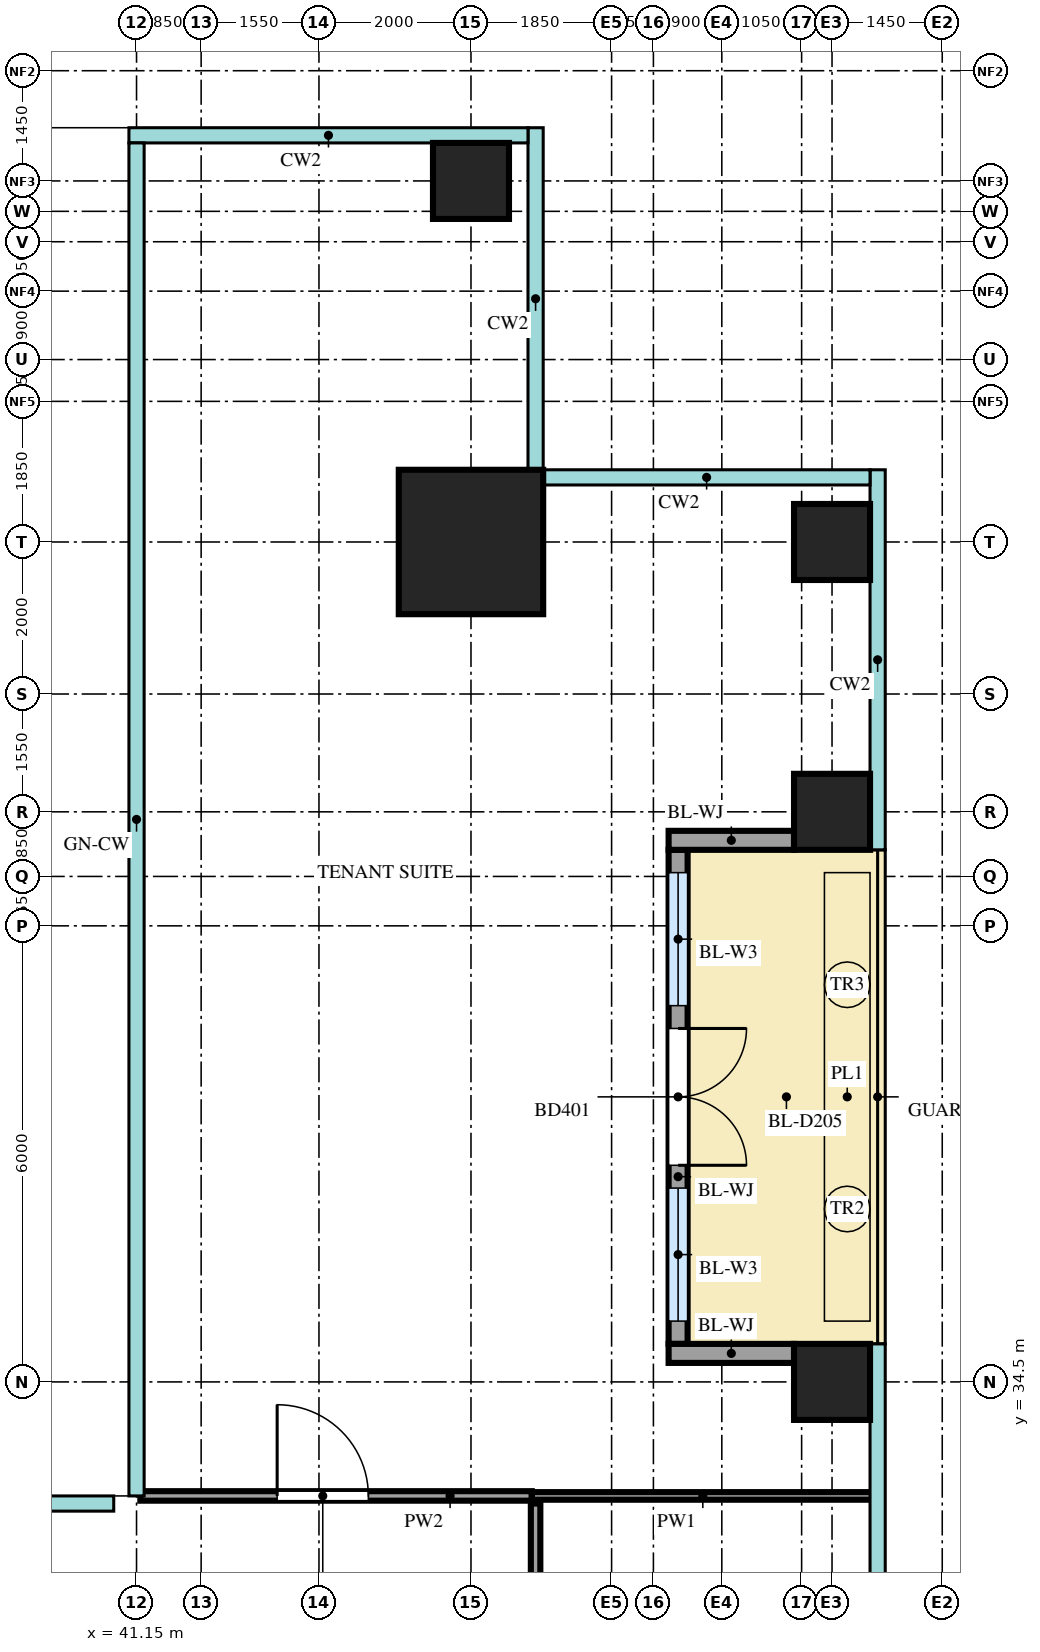
"""IFC4 building model, lengths in metres.
Left out: names, types, materials, properties, quantities, classifications, styles, units other than length and angle.
Written with IfcOpenShell. Run it as: python <this file> out.ifc"""

import sys

from ifc_helpers import new_model, si_unit, direction, frame, frame_2d, origin, origin_2d, place, context, subcontext, project, spatial, rectangle, extrude, source, transform, mapped, element, fill, save


model = new_model("IFC4")
c1 = context("Model", 3, precision=1e-05, world=origin(), true_north=direction((0.0, 1.0)))
c2 = subcontext(c1, "Body", "Model", "MODEL_VIEW")
j1 = project(units=[si_unit("LENGTHUNIT", "METRE"), si_unit("PLANEANGLEUNIT", "RADIAN")], contexts=[c1])
p1 = place(None, origin())
s1 = spatial("IfcSite", under=j1, at=p1, CompositionType="ELEMENT")
p2 = place(p1, origin())
s2 = spatial("IfcBuilding", under=s1, at=p2, CompositionType="ELEMENT")
p3 = place(p2, frame((0.0, 0.0, 184.7)))
s3 = spatial("IfcBuildingStorey", under=s2, at=p3, CompositionType="ELEMENT", Elevation=184.7)
m1 = source(origin(), c2, "Body", "SweptSolid", [
    extrude(rectangle(XDim=1.9, YDim=1.9, at=origin_2d()), origin(), (0.0, 0.0, 1.0), 4.0),
])
p4 = place(p3, frame((45.55, 45.55, 0.0), z_axis=(0.0, 0.0, 1.0), x_axis=(1.0, 0.0, 0.0)))
e1 = element("IfcColumn", 1, at=p4, inside=s3, PredefinedType="COLUMN", context=c2, shape_type="MappedRepresentation", body=[
    mapped(m1, transform((0.0, 0.0, 0.0))),
])
m2 = source(origin(), c2, "Body", "SweptSolid", [
    extrude(rectangle(XDim=1.0, YDim=1.0, at=origin_2d()), origin(), (0.0, 0.0, 1.0), 3.75),
])
for number, where, z_axis, x_axis in (
    (2, (50.3, 34.5, 0.0), (0.0, 0.0, 1.0), (1.0, 0.0, 0.0)),
    (3, (50.3, 42.0, 0.0), (0.0, 0.0, 1.0), (1.0, 0.0, 0.0)),
    (4, (50.3, 45.55, 0.0), (0.0, 0.0, 1.0), (1.0, 0.0, 0.0)),
    (5, (45.55, 50.3, 0.0), (0.0, 0.0, 1.0), (1.0, 0.0, 0.0)),
):
    element("IfcColumn", number, at=place(p3, frame(where, z_axis=z_axis, x_axis=x_axis)), inside=s3, PredefinedType="COLUMN", context=c2, shape_type="MappedRepresentation", body=[
        mapped(m2, transform((0.0, 0.0, 0.0))),
    ])
m3 = source(origin(), c2, "Body", "SweptSolid", [
    extrude(rectangle(XDim=6.5, YDim=0.25, at=frame_2d((3.25, 0.0))), origin(), (0.0, 0.0, 1.0), 3.2),
])
p5 = place(p3, frame((48.275, 35.0, 0.0), z_axis=(0.0, 0.0, 1.0), x_axis=(0.0, 1.0, 0.0)))
e6 = element("IfcWall", 6, at=p5, inside=s3, PredefinedType="SOLIDWALL", context=c2, shape_type="MappedRepresentation", body=[
    mapped(m3, transform((0.0, 0.0, 0.0))),
])
m4 = source(origin(), c2, "Body", "SweptSolid", [
    extrude(rectangle(XDim=1.75, YDim=2.4, at=frame_2d((0.875, 1.2))), frame((0.0, 0.135, 0.0), z_axis=(0.0, -1.0, 0.0), x_axis=(1.0, 0.0, 0.0)), (0.0, 0.0, 1.0), 0.27),
])
p6 = place(p5, frame((0.3, 0.0, 0.0)))
e7 = element("IfcOpeningElement", 7, at=p6, cuts=e6, PredefinedType="OPENING", context=c2, shape_type="MappedRepresentation", body=[
    mapped(m4, transform((0.0, 0.0, 0.0))),
])
p7 = place(p5, frame((4.45, 0.0, 0.0)))
e8 = element("IfcOpeningElement", 8, at=p7, cuts=e6, PredefinedType="OPENING", context=c2, shape_type="MappedRepresentation", body=[
    mapped(m4, transform((0.0, 0.0, 0.0))),
])
m5 = source(origin(), c2, "Body", "SweptSolid", [
    extrude(rectangle(XDim=1.8, YDim=2.4, at=frame_2d((0.9, 1.2))), frame((0.0, 0.135, 0.0), z_axis=(0.0, -1.0, 0.0), x_axis=(1.0, 0.0, 0.0)), (0.0, 0.0, 1.0), 0.27),
])
p8 = place(p5, frame((2.35, 0.0, 0.0)))
e9 = element("IfcOpeningElement", 9, at=p8, cuts=e6, PredefinedType="OPENING", context=c2, shape_type="MappedRepresentation", body=[
    mapped(m5, transform((0.0, 0.0, 0.0))),
])
m6 = source(origin(), c2, "Body", "SweptSolid", [
    extrude(rectangle(XDim=1.65, YDim=0.25, at=frame_2d((0.825, 0.0))), origin(), (0.0, 0.0, 1.0), 3.2),
])
for number, where, z_axis, x_axis in (
    (10, (49.8, 34.875, 0.0), (0.0, 0.0, 1.0), (-1.0, 0.0, 0.0)),
    (11, (49.8, 41.625, 0.0), (0.0, 0.0, 1.0), (-1.0, 0.0, 0.0)),
):
    element("IfcWall", number, at=place(p3, frame(where, z_axis=z_axis, x_axis=x_axis)), inside=s3, PredefinedType="SOLIDWALL", context=c2, shape_type="MappedRepresentation", body=[
        mapped(m6, transform((0.0, 0.0, 0.0))),
    ])
m7 = source(origin(), c2, "Body", "SweptSolid", [
    extrude(rectangle(XDim=3.2, YDim=0.125, at=frame_2d((1.6, 0.0))), origin(), (0.0, 0.0, 1.0), 3.8),
])
p9 = place(p3, frame((46.4, 29.7, 0.0), z_axis=(0.0, 0.0, 1.0), x_axis=(0.0, 1.0, 0.0)))
e12 = element("IfcWall", 12, at=p9, inside=s3, PredefinedType="PARTITIONING", context=c2, shape_type="MappedRepresentation", body=[
    mapped(m7, transform((0.0, 0.0, 0.0))),
])
m8 = source(origin(), c2, "Body", "SweptSolid", [
    extrude(rectangle(XDim=0.9, YDim=2.1, at=frame_2d((0.45, 1.05))), frame((0.0, 0.073, 0.0), z_axis=(0.0, -1.0, 0.0), x_axis=(1.0, 0.0, 0.0)), (0.0, 0.0, 1.0), 0.145),
])
p10 = place(p9, frame((1.15, 0.0, 0.0)))
e13 = element("IfcOpeningElement", 13, at=p10, cuts=e12, PredefinedType="OPENING", context=c2, shape_type="MappedRepresentation", body=[
    mapped(m8, transform((0.0, 0.0, 0.0))),
])
m9 = source(origin(), c2, "Body", "SweptSolid", [
    extrude(rectangle(XDim=5.15, YDim=0.125, at=frame_2d((2.575, 0.0))), origin(), (0.0, 0.0, 1.0), 3.8),
])
p11 = place(p3, frame((41.2, 33.0, 0.0), z_axis=(0.0, 0.0, 1.0), x_axis=(1.0, 0.0, 0.0)))
e14 = element("IfcWall", 14, at=p11, inside=s3, PredefinedType="PARTITIONING", context=c2, shape_type="MappedRepresentation", body=[
    mapped(m9, transform((0.0, 0.0, 0.0))),
])
m10 = source(origin(), c2, "Body", "SweptSolid", [
    extrude(rectangle(XDim=1.2, YDim=2.1, at=frame_2d((0.6, 1.05))), frame((0.0, 0.073, 0.0), z_axis=(0.0, -1.0, 0.0), x_axis=(1.0, 0.0, 0.0)), (0.0, 0.0, 1.0), 0.145),
])
p12 = place(p11, frame((1.8, 0.0, 0.0)))
e15 = element("IfcOpeningElement", 15, at=p12, cuts=e14, PredefinedType="OPENING", context=c2, shape_type="MappedRepresentation", body=[
    mapped(m10, transform((0.0, 0.0, 0.0))),
])
m11 = source(origin(), c2, "Body", "SweptSolid", [
    extrude(rectangle(XDim=4.5, YDim=0.1, at=frame_2d((2.25, 0.0))), origin(), (0.0, 0.0, 1.0), 3.8),
])
p13 = place(p3, frame((46.35, 33.0, 0.0), z_axis=(0.0, 0.0, 1.0), x_axis=(1.0, 0.0, 0.0)))
e16 = element("IfcWall", 16, at=p13, inside=s3, PredefinedType="PARTITIONING", context=c2, shape_type="MappedRepresentation", body=[
    mapped(m11, transform((0.0, 0.0, 0.0))),
])
m12 = source(origin(), c2, "Body", "SweptSolid", [
    extrude(rectangle(XDim=1.75, YDim=2.4, at=frame_2d((0.875, 1.2))), frame((0.0, 0.03, 0.0), z_axis=(0.0, -1.0, 0.0), x_axis=(1.0, 0.0, 0.0)), (0.0, 0.0, 1.0), 0.06),
])
p14 = place(p6, origin())
e17 = element("IfcWindow", 17, at=p14, inside=s3, PartitioningType="SINGLE_PANEL", PredefinedType="WINDOW", context=c2, shape_type="MappedRepresentation", body=[
    mapped(m12, transform((0.0, 0.0, 0.0))),
])
fill(e7, e17)
p15 = place(p7, origin())
e18 = element("IfcWindow", 18, at=p15, inside=s3, PartitioningType="SINGLE_PANEL", PredefinedType="WINDOW", context=c2, shape_type="MappedRepresentation", body=[
    mapped(m12, transform((0.0, 0.0, 0.0))),
])
fill(e8, e18)
m13 = source(origin(), c2, "Body", "SweptSolid", [
    extrude(rectangle(XDim=1.8, YDim=2.4, at=frame_2d((0.9, 1.2))), frame((0.0, 0.025, 0.0), z_axis=(0.0, -1.0, 0.0), x_axis=(1.0, 0.0, 0.0)), (0.0, 0.0, 1.0), 0.05),
])
p16 = place(p8, origin())
e19 = element("IfcDoor", 19, at=p16, inside=s3, OperationType="DOUBLE_DOOR_DOUBLE_SWING", PredefinedType="DOOR", context=c2, shape_type="MappedRepresentation", body=[
    mapped(m13, transform((0.0, 0.0, 0.0))),
])
fill(e9, e19)
m14 = source(origin(), c2, "Body", "SweptSolid", [
    extrude(rectangle(XDim=1.2, YDim=2.1, at=frame_2d((0.6, 1.05))), frame((0.0, 0.025, 0.0), z_axis=(0.0, -1.0, 0.0), x_axis=(1.0, 0.0, 0.0)), (0.0, 0.0, 1.0), 0.05),
])
p17 = place(p12, origin())
e20 = element("IfcDoor", 20, at=p17, inside=s3, OperationType="SINGLE_SWING_RIGHT", PredefinedType="DOOR", context=c2, shape_type="MappedRepresentation", body=[
    mapped(m14, transform((0.0, 0.0, 0.0))),
])
fill(e15, e20)
save(model, sys.argv[1])
